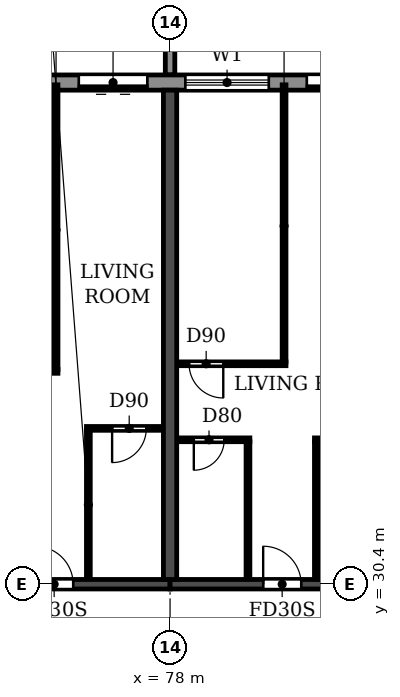
"""IFC4 building model, lengths in metres.
Left out: names, types, materials, properties, quantities, classifications, styles, units other than length and angle.
Written with IfcOpenShell. Run it as: python <this file> out.ifc"""

import sys

from ifc_helpers import new_model, si_unit, direction, frame, frame_2d, origin, place, context, subcontext, project, spatial, polyline, rectangle, outline, extrude, source, transform, mapped, element, fill, save


model = new_model("IFC4")
c1 = context("Model", 3, precision=1e-05, world=origin(), true_north=direction((0.0, 1.0)))
c2 = subcontext(c1, "Body", "Model", "MODEL_VIEW")
j1 = project(units=[si_unit("LENGTHUNIT", "METRE"), si_unit("PLANEANGLEUNIT", "RADIAN")], contexts=[c1])
p1 = place(None, origin())
s1 = spatial("IfcSite", under=j1, at=p1, CompositionType="ELEMENT")
p2 = place(p1, origin())
s2 = spatial("IfcBuilding", under=s1, at=p2, CompositionType="ELEMENT")
p3 = place(p2, frame((0.0, 0.0, 92.7)))
s3 = spatial("IfcBuildingStorey", under=s2, at=p3, CompositionType="ELEMENT", Elevation=92.7)
p4 = place(p3, frame((78.0, 30.525, 0.0), z_axis=(0.0, 0.0, 1.0), x_axis=(0.0, 1.0, 0.0)))
e1 = element("IfcWall", 1, at=p4, inside=s3, PredefinedType="SHEAR", context=c2, shape_type="SweptSolid", body=[
    extrude(rectangle(XDim=12.875, YDim=0.35, at=frame_2d((6.438, 0.0))), origin(), (0.0, 0.0, 1.0), 3.06),
])
p5 = place(p3, frame((72.0, 30.4, 0.0), z_axis=(0.0, 0.0, 1.0), x_axis=(1.0, 0.0, 0.0)))
e2 = element("IfcWall", 2, at=p5, inside=s3, PredefinedType="SHEAR", context=c2, shape_type="SweptSolid", body=[
    extrude(rectangle(XDim=6.0, YDim=0.25, at=frame_2d((3.0, 0.0))), origin(), (0.0, 0.0, 1.0), 2.46),
])
p6 = place(p5, frame((2.45, 0.0, 0.0)))
e3 = element("IfcOpeningElement", 3, at=p6, cuts=e2, PredefinedType="OPENING", context=c2, shape_type="SweptSolid", body=[
    extrude(rectangle(XDim=1.0, YDim=2.1, at=frame_2d((0.5, 1.05))), frame((0.0, 0.135, 0.0), z_axis=(0.0, -1.0, 0.0), x_axis=(1.0, 0.0, 0.0)), (0.0, 0.0, 1.0), 0.27),
])
p7 = place(p3, frame((78.0, 30.4, 0.0), z_axis=(0.0, 0.0, 1.0), x_axis=(1.0, 0.0, 0.0)))
e4 = element("IfcWall", 4, at=p7, inside=s3, PredefinedType="SHEAR", context=c2, shape_type="SweptSolid", body=[
    extrude(rectangle(XDim=6.0, YDim=0.25, at=frame_2d((3.0, 0.0))), origin(), (0.0, 0.0, 1.0), 2.46),
])
p8 = place(p7, frame((2.45, 0.0, 0.0)))
e5 = element("IfcOpeningElement", 5, at=p8, cuts=e4, PredefinedType="OPENING", context=c2, shape_type="SweptSolid", body=[
    extrude(rectangle(XDim=1.0, YDim=2.1, at=frame_2d((0.5, 1.05))), frame((0.0, 0.135, 0.0), z_axis=(0.0, -1.0, 0.0), x_axis=(1.0, 0.0, 0.0)), (0.0, 0.0, 1.0), 0.27),
])
p9 = place(p3, frame((91.317, 43.6, 0.0), z_axis=(0.0, 0.0, 1.0), x_axis=(-1.0, 0.0, 0.0)))
e6 = element("IfcWall", 6, at=p9, inside=s3, PredefinedType="STANDARD", context=c2, shape_type="SweptSolid", body=[
    extrude(rectangle(XDim=80.634, YDim=0.4, at=frame_2d((40.317, 0.0))), origin(), (0.0, 0.0, 1.0), 3.06),
])
p10 = place(p9, frame((76.717, 0.0, 0.9)))
e7 = element("IfcOpeningElement", 7, at=p10, cuts=e6, PredefinedType="OPENING", context=c2, shape_type="SweptSolid", body=[
    extrude(rectangle(XDim=2.2, YDim=1.5, at=frame_2d((1.1, 0.75))), frame((0.0, 0.21, 0.0), z_axis=(0.0, -1.0, 0.0), x_axis=(1.0, 0.0, 0.0)), (0.0, 0.0, 1.0), 0.42),
])
p11 = place(p9, frame((73.917, 0.0, 0.0)))
e8 = element("IfcOpeningElement", 8, at=p11, cuts=e6, PredefinedType="OPENING", context=c2, shape_type="SweptSolid", body=[
    extrude(rectangle(XDim=1.8, YDim=2.4, at=frame_2d((0.9, 1.2))), frame((0.0, 0.21, 0.0), z_axis=(0.0, -1.0, 0.0), x_axis=(1.0, 0.0, 0.0)), (0.0, 0.0, 1.0), 0.42),
])
p12 = place(p9, frame((70.717, 0.0, 0.9)))
e9 = element("IfcOpeningElement", 9, at=p12, cuts=e6, PredefinedType="OPENING", context=c2, shape_type="SweptSolid", body=[
    extrude(rectangle(XDim=2.2, YDim=1.5, at=frame_2d((1.1, 0.75))), frame((0.0, 0.21, 0.0), z_axis=(0.0, -1.0, 0.0), x_axis=(1.0, 0.0, 0.0)), (0.0, 0.0, 1.0), 0.42),
])
p13 = place(p9, frame((67.717, 0.0, 0.9)))
e10 = element("IfcOpeningElement", 10, at=p13, cuts=e6, PredefinedType="OPENING", context=c2, shape_type="SweptSolid", body=[
    extrude(rectangle(XDim=2.2, YDim=1.5, at=frame_2d((1.1, 0.75))), frame((0.0, 0.21, 0.0), z_axis=(0.0, -1.0, 0.0), x_axis=(1.0, 0.0, 0.0)), (0.0, 0.0, 1.0), 0.42),
])
p14 = place(p9, frame((64.717, 0.0, 0.9)))
e11 = element("IfcOpeningElement", 11, at=p14, cuts=e6, PredefinedType="OPENING", context=c2, shape_type="SweptSolid", body=[
    extrude(rectangle(XDim=2.2, YDim=1.5, at=frame_2d((1.1, 0.75))), frame((0.0, 0.21, 0.0), z_axis=(0.0, -1.0, 0.0), x_axis=(1.0, 0.0, 0.0)), (0.0, 0.0, 1.0), 0.42),
])
p15 = place(p9, frame((61.917, 0.0, 0.0)))
e12 = element("IfcOpeningElement", 12, at=p15, cuts=e6, PredefinedType="OPENING", context=c2, shape_type="SweptSolid", body=[
    extrude(rectangle(XDim=1.8, YDim=2.4, at=frame_2d((0.9, 1.2))), frame((0.0, 0.21, 0.0), z_axis=(0.0, -1.0, 0.0), x_axis=(1.0, 0.0, 0.0)), (0.0, 0.0, 1.0), 0.42),
])
p16 = place(p9, frame((58.717, 0.0, 0.9)))
e13 = element("IfcOpeningElement", 13, at=p16, cuts=e6, PredefinedType="OPENING", context=c2, shape_type="SweptSolid", body=[
    extrude(rectangle(XDim=2.2, YDim=1.5, at=frame_2d((1.1, 0.75))), frame((0.0, 0.21, 0.0), z_axis=(0.0, -1.0, 0.0), x_axis=(1.0, 0.0, 0.0)), (0.0, 0.0, 1.0), 0.42),
])
p17 = place(p9, frame((55.717, 0.0, 0.9)))
e14 = element("IfcOpeningElement", 14, at=p17, cuts=e6, PredefinedType="OPENING", context=c2, shape_type="SweptSolid", body=[
    extrude(rectangle(XDim=2.2, YDim=1.5, at=frame_2d((1.1, 0.75))), frame((0.0, 0.21, 0.0), z_axis=(0.0, -1.0, 0.0), x_axis=(1.0, 0.0, 0.0)), (0.0, 0.0, 1.0), 0.42),
])
p18 = place(p9, frame((52.917, 0.0, 0.0)))
e15 = element("IfcOpeningElement", 15, at=p18, cuts=e6, PredefinedType="OPENING", context=c2, shape_type="SweptSolid", body=[
    extrude(rectangle(XDim=1.8, YDim=2.4, at=frame_2d((0.9, 1.2))), frame((0.0, 0.21, 0.0), z_axis=(0.0, -1.0, 0.0), x_axis=(1.0, 0.0, 0.0)), (0.0, 0.0, 1.0), 0.42),
])
p19 = place(p9, frame((49.717, 0.0, 0.9)))
e16 = element("IfcOpeningElement", 16, at=p19, cuts=e6, PredefinedType="OPENING", context=c2, shape_type="SweptSolid", body=[
    extrude(rectangle(XDim=2.2, YDim=1.5, at=frame_2d((1.1, 0.75))), frame((0.0, 0.21, 0.0), z_axis=(0.0, -1.0, 0.0), x_axis=(1.0, 0.0, 0.0)), (0.0, 0.0, 1.0), 0.42),
])
p20 = place(p9, frame((46.717, 0.0, 0.9)))
e17 = element("IfcOpeningElement", 17, at=p20, cuts=e6, PredefinedType="OPENING", context=c2, shape_type="SweptSolid", body=[
    extrude(rectangle(XDim=2.2, YDim=1.5, at=frame_2d((1.1, 0.75))), frame((0.0, 0.21, 0.0), z_axis=(0.0, -1.0, 0.0), x_axis=(1.0, 0.0, 0.0)), (0.0, 0.0, 1.0), 0.42),
])
p21 = place(p9, frame((43.717, 0.0, 0.9)))
e18 = element("IfcOpeningElement", 18, at=p21, cuts=e6, PredefinedType="OPENING", context=c2, shape_type="SweptSolid", body=[
    extrude(rectangle(XDim=2.2, YDim=1.5, at=frame_2d((1.1, 0.75))), frame((0.0, 0.21, 0.0), z_axis=(0.0, -1.0, 0.0), x_axis=(1.0, 0.0, 0.0)), (0.0, 0.0, 1.0), 0.42),
])
p22 = place(p9, frame((40.717, 0.0, 0.9)))
e19 = element("IfcOpeningElement", 19, at=p22, cuts=e6, PredefinedType="OPENING", context=c2, shape_type="SweptSolid", body=[
    extrude(rectangle(XDim=2.2, YDim=1.5, at=frame_2d((1.1, 0.75))), frame((0.0, 0.21, 0.0), z_axis=(0.0, -1.0, 0.0), x_axis=(1.0, 0.0, 0.0)), (0.0, 0.0, 1.0), 0.42),
])
p23 = place(p9, frame((37.917, 0.0, 0.0)))
e20 = element("IfcOpeningElement", 20, at=p23, cuts=e6, PredefinedType="OPENING", context=c2, shape_type="SweptSolid", body=[
    extrude(rectangle(XDim=1.8, YDim=2.4, at=frame_2d((0.9, 1.2))), frame((0.0, 0.21, 0.0), z_axis=(0.0, -1.0, 0.0), x_axis=(1.0, 0.0, 0.0)), (0.0, 0.0, 1.0), 0.42),
])
p24 = place(p9, frame((34.917, 0.0, 0.0)))
e21 = element("IfcOpeningElement", 21, at=p24, cuts=e6, PredefinedType="OPENING", context=c2, shape_type="SweptSolid", body=[
    extrude(rectangle(XDim=1.8, YDim=2.4, at=frame_2d((0.9, 1.2))), frame((0.0, 0.21, 0.0), z_axis=(0.0, -1.0, 0.0), x_axis=(1.0, 0.0, 0.0)), (0.0, 0.0, 1.0), 0.42),
])
p25 = place(p9, frame((31.717, 0.0, 0.9)))
e22 = element("IfcOpeningElement", 22, at=p25, cuts=e6, PredefinedType="OPENING", context=c2, shape_type="SweptSolid", body=[
    extrude(rectangle(XDim=2.2, YDim=1.5, at=frame_2d((1.1, 0.75))), frame((0.0, 0.21, 0.0), z_axis=(0.0, -1.0, 0.0), x_axis=(1.0, 0.0, 0.0)), (0.0, 0.0, 1.0), 0.42),
])
p26 = place(p9, frame((28.717, 0.0, 0.9)))
e23 = element("IfcOpeningElement", 23, at=p26, cuts=e6, PredefinedType="OPENING", context=c2, shape_type="SweptSolid", body=[
    extrude(rectangle(XDim=2.2, YDim=1.5, at=frame_2d((1.1, 0.75))), frame((0.0, 0.21, 0.0), z_axis=(0.0, -1.0, 0.0), x_axis=(1.0, 0.0, 0.0)), (0.0, 0.0, 1.0), 0.42),
])
p27 = place(p9, frame((25.717, 0.0, 0.9)))
e24 = element("IfcOpeningElement", 24, at=p27, cuts=e6, PredefinedType="OPENING", context=c2, shape_type="SweptSolid", body=[
    extrude(rectangle(XDim=2.2, YDim=1.5, at=frame_2d((1.1, 0.75))), frame((0.0, 0.21, 0.0), z_axis=(0.0, -1.0, 0.0), x_axis=(1.0, 0.0, 0.0)), (0.0, 0.0, 1.0), 0.42),
])
p28 = place(p9, frame((22.717, 0.0, 0.9)))
e25 = element("IfcOpeningElement", 25, at=p28, cuts=e6, PredefinedType="OPENING", context=c2, shape_type="SweptSolid", body=[
    extrude(rectangle(XDim=2.2, YDim=1.5, at=frame_2d((1.1, 0.75))), frame((0.0, 0.21, 0.0), z_axis=(0.0, -1.0, 0.0), x_axis=(1.0, 0.0, 0.0)), (0.0, 0.0, 1.0), 0.42),
])
p29 = place(p9, frame((19.917, 0.0, 0.0)))
e26 = element("IfcOpeningElement", 26, at=p29, cuts=e6, PredefinedType="OPENING", context=c2, shape_type="SweptSolid", body=[
    extrude(rectangle(XDim=1.8, YDim=2.4, at=frame_2d((0.9, 1.2))), frame((0.0, 0.21, 0.0), z_axis=(0.0, -1.0, 0.0), x_axis=(1.0, 0.0, 0.0)), (0.0, 0.0, 1.0), 0.42),
])
p30 = place(p9, frame((16.717, 0.0, 0.9)))
e27 = element("IfcOpeningElement", 27, at=p30, cuts=e6, PredefinedType="OPENING", context=c2, shape_type="SweptSolid", body=[
    extrude(rectangle(XDim=2.2, YDim=1.5, at=frame_2d((1.1, 0.75))), frame((0.0, 0.21, 0.0), z_axis=(0.0, -1.0, 0.0), x_axis=(1.0, 0.0, 0.0)), (0.0, 0.0, 1.0), 0.42),
])
p31 = place(p9, frame((13.917, 0.0, 0.0)))
e28 = element("IfcOpeningElement", 28, at=p31, cuts=e6, PredefinedType="OPENING", context=c2, shape_type="SweptSolid", body=[
    extrude(rectangle(XDim=1.8, YDim=2.4, at=frame_2d((0.9, 1.2))), frame((0.0, 0.21, 0.0), z_axis=(0.0, -1.0, 0.0), x_axis=(1.0, 0.0, 0.0)), (0.0, 0.0, 1.0), 0.42),
])
p32 = place(p9, frame((10.717, 0.0, 0.9)))
e29 = element("IfcOpeningElement", 29, at=p32, cuts=e6, PredefinedType="OPENING", context=c2, shape_type="SweptSolid", body=[
    extrude(rectangle(XDim=2.2, YDim=1.5, at=frame_2d((1.1, 0.75))), frame((0.0, 0.21, 0.0), z_axis=(0.0, -1.0, 0.0), x_axis=(1.0, 0.0, 0.0)), (0.0, 0.0, 1.0), 0.42),
])
p33 = place(p9, frame((7.917, 0.0, 0.0)))
e30 = element("IfcOpeningElement", 30, at=p33, cuts=e6, PredefinedType="OPENING", context=c2, shape_type="SweptSolid", body=[
    extrude(rectangle(XDim=1.8, YDim=2.4, at=frame_2d((0.9, 1.2))), frame((0.0, 0.21, 0.0), z_axis=(0.0, -1.0, 0.0), x_axis=(1.0, 0.0, 0.0)), (0.0, 0.0, 1.0), 0.42),
])
p34 = place(p9, frame((4.717, 0.0, 0.9)))
e31 = element("IfcOpeningElement", 31, at=p34, cuts=e6, PredefinedType="OPENING", context=c2, shape_type="SweptSolid", body=[
    extrude(rectangle(XDim=2.2, YDim=1.5, at=frame_2d((1.1, 0.75))), frame((0.0, 0.21, 0.0), z_axis=(0.0, -1.0, 0.0), x_axis=(1.0, 0.0, 0.0)), (0.0, 0.0, 1.0), 0.42),
])
p35 = place(p9, frame((1.917, 0.0, 0.0)))
e32 = element("IfcOpeningElement", 32, at=p35, cuts=e6, PredefinedType="OPENING", context=c2, shape_type="SweptSolid", body=[
    extrude(rectangle(XDim=1.8, YDim=2.4, at=frame_2d((0.9, 1.2))), frame((0.0, 0.21, 0.0), z_axis=(0.0, -1.0, 0.0), x_axis=(1.0, 0.0, 0.0)), (0.0, 0.0, 1.0), 0.42),
])
m1 = source(origin(), c2, "Body", "SweptSolid", [
    extrude(outline(polyline([(0.0, 0.0), (0.25, 0.0), (0.25, 3.1), (0.0, 3.1), (0.0, 0.0)])), origin(), (0.0, 0.0, 1.0), 3.1),
])
p36 = place(p3, frame((77.875, 43.8, 0.0)))
e33 = element("IfcWall", 33, at=p36, inside=s3, PredefinedType="STANDARD", context=c2, shape_type="MappedRepresentation", body=[
    mapped(m1, transform((0.0, 0.0, 0.0))),
])
p37 = place(p3, frame((78.185, 34.2, 0.0), z_axis=(0.0, 0.0, 1.0), x_axis=(1.0, 0.0, 0.0)))
e34 = element("IfcWall", 34, at=p37, inside=s3, PredefinedType="PARTITIONING", context=c2, shape_type="SweptSolid", body=[
    extrude(rectangle(XDim=1.915, YDim=0.1, at=frame_2d((0.958, 0.0))), origin(), (0.0, 0.0, 1.0), 3.06),
])
p38 = place(p37, frame((0.44, 0.0, 0.0)))
e35 = element("IfcOpeningElement", 35, at=p38, cuts=e34, PredefinedType="OPENING", context=c2, shape_type="SweptSolid", body=[
    extrude(rectangle(XDim=0.8, YDim=2.1, at=frame_2d((0.4, 1.05))), frame((0.0, 0.06, 0.0), z_axis=(0.0, -1.0, 0.0), x_axis=(1.0, 0.0, 0.0)), (0.0, 0.0, 1.0), 0.12),
])
p39 = place(p3, frame((81.8, 34.2, 0.0), z_axis=(0.0, 0.0, 1.0), x_axis=(1.0, 0.0, 0.0)))
e36 = element("IfcWall", 36, at=p39, inside=s3, PredefinedType="PARTITIONING", context=c2, shape_type="SweptSolid", body=[
    extrude(rectangle(XDim=2.015, YDim=0.1, at=frame_2d((1.007, 0.0))), origin(), (0.0, 0.0, 1.0), 3.06),
])
p40 = place(p39, frame((0.675, 0.0, 0.0)))
e37 = element("IfcOpeningElement", 37, at=p40, cuts=e36, PredefinedType="OPENING", context=c2, shape_type="SweptSolid", body=[
    extrude(rectangle(XDim=0.9, YDim=2.1, at=frame_2d((0.45, 1.05))), frame((0.0, 0.06, 0.0), z_axis=(0.0, -1.0, 0.0), x_axis=(1.0, 0.0, 0.0)), (0.0, 0.0, 1.0), 0.12),
])
p41 = place(p3, frame((75.8, 34.5, 0.0), z_axis=(0.0, 0.0, 1.0), x_axis=(1.0, 0.0, 0.0)))
e38 = element("IfcWall", 38, at=p41, inside=s3, PredefinedType="PARTITIONING", context=c2, shape_type="SweptSolid", body=[
    extrude(rectangle(XDim=2.015, YDim=0.1, at=frame_2d((1.007, 0.0))), origin(), (0.0, 0.0, 1.0), 3.06),
])
p42 = place(p41, frame((0.675, 0.0, 0.0)))
e39 = element("IfcOpeningElement", 39, at=p42, cuts=e38, PredefinedType="OPENING", context=c2, shape_type="SweptSolid", body=[
    extrude(rectangle(XDim=0.9, YDim=2.1, at=frame_2d((0.45, 1.05))), frame((0.0, 0.06, 0.0), z_axis=(0.0, -1.0, 0.0), x_axis=(1.0, 0.0, 0.0)), (0.0, 0.0, 1.0), 0.12),
])
p43 = place(p3, frame((72.185, 36.0, 0.0), z_axis=(0.0, 0.0, 1.0), x_axis=(1.0, 0.0, 0.0)))
e40 = element("IfcWall", 40, at=p43, inside=s3, PredefinedType="PARTITIONING", context=c2, shape_type="SweptSolid", body=[
    extrude(rectangle(XDim=2.865, YDim=0.1, at=frame_2d((1.433, 0.0))), origin(), (0.0, 0.0, 1.0), 3.06),
])
p44 = place(p43, frame((1.415, 0.0, 0.0)))
e41 = element("IfcOpeningElement", 41, at=p44, cuts=e40, PredefinedType="OPENING", context=c2, shape_type="SweptSolid", body=[
    extrude(rectangle(XDim=0.9, YDim=2.1, at=frame_2d((0.45, 1.05))), frame((0.0, 0.06, 0.0), z_axis=(0.0, -1.0, 0.0), x_axis=(1.0, 0.0, 0.0)), (0.0, 0.0, 1.0), 0.12),
])
p45 = place(p3, frame((78.185, 36.2, 0.0), z_axis=(0.0, 0.0, 1.0), x_axis=(1.0, 0.0, 0.0)))
e42 = element("IfcWall", 42, at=p45, inside=s3, PredefinedType="PARTITIONING", context=c2, shape_type="SweptSolid", body=[
    extrude(rectangle(XDim=2.865, YDim=0.1, at=frame_2d((1.433, 0.0))), origin(), (0.0, 0.0, 1.0), 3.06),
])
p46 = place(p45, frame((0.315, 0.0, 0.0)))
e43 = element("IfcOpeningElement", 43, at=p46, cuts=e42, PredefinedType="OPENING", context=c2, shape_type="SweptSolid", body=[
    extrude(rectangle(XDim=0.9, YDim=2.1, at=frame_2d((0.45, 1.05))), frame((0.0, 0.06, 0.0), z_axis=(0.0, -1.0, 0.0), x_axis=(1.0, 0.0, 0.0)), (0.0, 0.0, 1.0), 0.12),
])
p47 = place(p3, frame((75.0, 36.05, 0.0), z_axis=(0.0, 0.0, 1.0), x_axis=(0.0, 1.0, 0.0)))
e44 = element("IfcWall", 44, at=p47, inside=s3, PredefinedType="PARTITIONING", context=c2, shape_type="SweptSolid", body=[
    extrude(rectangle(XDim=7.49, YDim=0.1, at=frame_2d((3.745, 0.0))), origin(), (0.0, 0.0, 1.0), 3.06),
])
p48 = place(p3, frame((75.85, 30.535, 0.0), z_axis=(0.0, 0.0, 1.0), x_axis=(0.0, 1.0, 0.0)))
e45 = element("IfcWall", 45, at=p48, inside=s3, PredefinedType="PARTITIONING", context=c2, shape_type="SweptSolid", body=[
    extrude(rectangle(XDim=3.915, YDim=0.1, at=frame_2d((1.958, 0.0))), origin(), (0.0, 0.0, 1.0), 3.06),
])
p49 = place(p3, frame((80.05, 30.535, 0.0), z_axis=(0.0, 0.0, 1.0), x_axis=(0.0, 1.0, 0.0)))
e46 = element("IfcWall", 46, at=p49, inside=s3, PredefinedType="PARTITIONING", context=c2, shape_type="SweptSolid", body=[
    extrude(rectangle(XDim=3.615, YDim=0.1, at=frame_2d((1.808, 0.0))), origin(), (0.0, 0.0, 1.0), 3.06),
])
p50 = place(p3, frame((81.0, 36.25, 0.0), z_axis=(0.0, 0.0, 1.0), x_axis=(0.0, 1.0, 0.0)))
e47 = element("IfcWall", 47, at=p50, inside=s3, PredefinedType="PARTITIONING", context=c2, shape_type="SweptSolid", body=[
    extrude(rectangle(XDim=7.29, YDim=0.1, at=frame_2d((3.645, 0.0))), origin(), (0.0, 0.0, 1.0), 3.06),
])
p51 = place(p3, frame((81.85, 30.535, 0.0), z_axis=(0.0, 0.0, 1.0), x_axis=(0.0, 1.0, 0.0)))
e48 = element("IfcWall", 48, at=p51, inside=s3, PredefinedType="PARTITIONING", context=c2, shape_type="SweptSolid", body=[
    extrude(rectangle(XDim=3.615, YDim=0.1, at=frame_2d((1.808, 0.0))), origin(), (0.0, 0.0, 1.0), 3.06),
])
p52 = place(p31, origin())
e49 = element("IfcDoor", 49, at=p52, inside=s3, OperationType="DOUBLE_DOOR_SLIDING", PredefinedType="DOOR", context=c2, shape_type="SweptSolid", body=[
    extrude(rectangle(XDim=1.8, YDim=2.4, at=frame_2d((0.9, 1.2))), frame((0.0, 0.025, 0.0), z_axis=(0.0, -1.0, 0.0), x_axis=(1.0, 0.0, 0.0)), (0.0, 0.0, 1.0), 0.05),
])
fill(e28, e49)
p53 = place(p32, origin())
e50 = element("IfcWindow", 50, at=p53, inside=s3, PartitioningType="DOUBLE_PANEL_HORIZONTAL", PredefinedType="WINDOW", context=c2, shape_type="SweptSolid", body=[
    extrude(rectangle(XDim=2.2, YDim=1.5, at=frame_2d((1.1, 0.75))), frame((0.0, 0.03, 0.0), z_axis=(0.0, -1.0, 0.0), x_axis=(1.0, 0.0, 0.0)), (0.0, 0.0, 1.0), 0.06),
])
fill(e29, e50)
p54 = place(p33, origin())
e51 = element("IfcDoor", 51, at=p54, inside=s3, OperationType="DOUBLE_DOOR_SLIDING", PredefinedType="DOOR", context=c2, shape_type="SweptSolid", body=[
    extrude(rectangle(XDim=1.8, YDim=2.4, at=frame_2d((0.9, 1.2))), frame((0.0, 0.025, 0.0), z_axis=(0.0, -1.0, 0.0), x_axis=(1.0, 0.0, 0.0)), (0.0, 0.0, 1.0), 0.05),
])
fill(e30, e51)
p55 = place(p6, origin())
e52 = element("IfcDoor", 52, at=p55, inside=s3, OperationType="SINGLE_SWING_LEFT", PredefinedType="DOOR", context=c2, shape_type="SweptSolid", body=[
    extrude(rectangle(XDim=1.0, YDim=2.1, at=frame_2d((0.5, 1.05))), frame((0.0, 0.025, 0.0), z_axis=(0.0, -1.0, 0.0), x_axis=(1.0, 0.0, 0.0)), (0.0, 0.0, 1.0), 0.05),
])
fill(e3, e52)
p56 = place(p42, frame((0.9, 0.0, 0.0), z_axis=(0.0, 0.0, 1.0), x_axis=(-1.0, 0.0, 0.0)))
e53 = element("IfcDoor", 53, at=p56, inside=s3, OperationType="SINGLE_SWING_RIGHT", PredefinedType="DOOR", context=c2, shape_type="SweptSolid", body=[
    extrude(rectangle(XDim=0.9, YDim=2.1, at=frame_2d((0.45, 1.05))), frame((0.0, 0.025, 0.0), z_axis=(0.0, -1.0, 0.0), x_axis=(1.0, 0.0, 0.0)), (0.0, 0.0, 1.0), 0.05),
])
fill(e39, e53)
p57 = place(p46, frame((0.9, 0.0, 0.0), z_axis=(0.0, 0.0, 1.0), x_axis=(-1.0, 0.0, 0.0)))
e54 = element("IfcDoor", 54, at=p57, inside=s3, OperationType="SINGLE_SWING_LEFT", PredefinedType="DOOR", context=c2, shape_type="SweptSolid", body=[
    extrude(rectangle(XDim=0.9, YDim=2.1, at=frame_2d((0.45, 1.05))), frame((0.0, 0.025, 0.0), z_axis=(0.0, -1.0, 0.0), x_axis=(1.0, 0.0, 0.0)), (0.0, 0.0, 1.0), 0.05),
])
fill(e43, e54)
p58 = place(p38, frame((0.8, 0.0, 0.0), z_axis=(0.0, 0.0, 1.0), x_axis=(-1.0, 0.0, 0.0)))
e55 = element("IfcDoor", 55, at=p58, inside=s3, OperationType="SINGLE_SWING_RIGHT", PredefinedType="DOOR", context=c2, shape_type="SweptSolid", body=[
    extrude(rectangle(XDim=0.8, YDim=2.1, at=frame_2d((0.4, 1.05))), frame((0.0, 0.025, 0.0), z_axis=(0.0, -1.0, 0.0), x_axis=(1.0, 0.0, 0.0)), (0.0, 0.0, 1.0), 0.05),
])
fill(e35, e55)
p59 = place(p8, origin())
e56 = element("IfcDoor", 56, at=p59, inside=s3, OperationType="SINGLE_SWING_LEFT", PredefinedType="DOOR", context=c2, shape_type="SweptSolid", body=[
    extrude(rectangle(XDim=1.0, YDim=2.1, at=frame_2d((0.5, 1.05))), frame((0.0, 0.025, 0.0), z_axis=(0.0, -1.0, 0.0), x_axis=(1.0, 0.0, 0.0)), (0.0, 0.0, 1.0), 0.05),
])
fill(e5, e56)
save(model, sys.argv[1])
